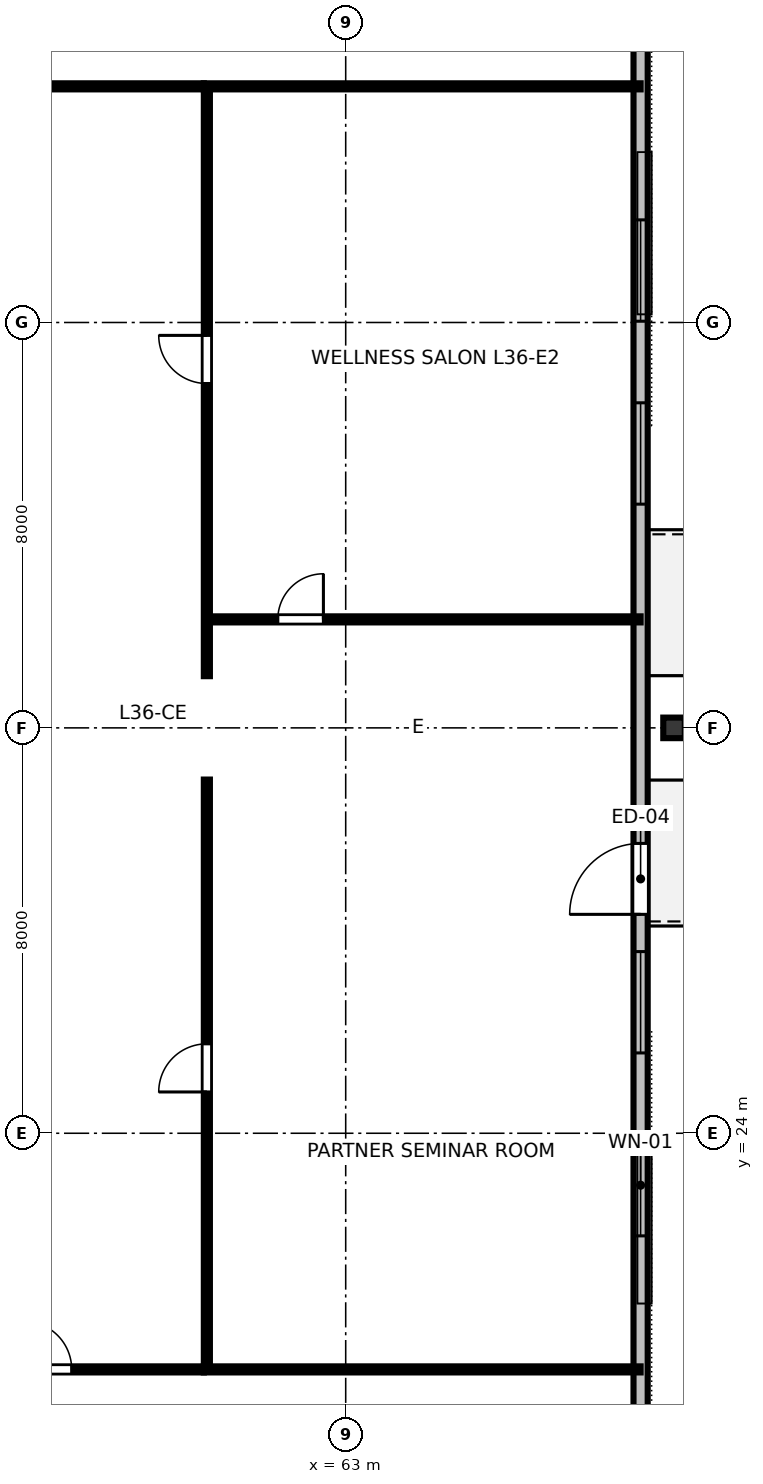
"""IFC4 building model, lengths in metres.
Left out: names, types, materials, properties, quantities, classifications, styles, units other than length and angle.
Written with IfcOpenShell. Run it as: python <this file> out.ifc"""

import sys

from ifc_helpers import new_model, si_unit, direction, frame, frame_2d, origin, origin_2d, place, context, subcontext, project, spatial, rectangle, i_section, extrude, element, fill, save


model = new_model("IFC4")
c1 = context("Model", 3, precision=1e-05, world=origin(), true_north=direction((0.0, 1.0)))
c2 = subcontext(c1, "Body", "Model", "MODEL_VIEW")
j1 = project(units=[si_unit("LENGTHUNIT", "METRE"), si_unit("PLANEANGLEUNIT", "RADIAN")], contexts=[c1])
p1 = place(None, origin())
s1 = spatial("IfcSite", under=j1, at=p1, CompositionType="ELEMENT")
p2 = place(p1, origin())
s2 = spatial("IfcBuilding", under=s1, at=p2, CompositionType="ELEMENT")
p3 = place(p2, frame((0.0, 0.0, 138.4)))
s3 = spatial("IfcBuildingStorey", under=s2, at=p3, CompositionType="ELEMENT", Elevation=138.4)
p4 = place(p3, frame((69.48, 32.0, 0.0), z_axis=(0.0, 0.0, 1.0), x_axis=(0.0, 1.0, 0.0)))
e1 = element("IfcColumn", 1, at=p4, inside=s3, PredefinedType="COLUMN", context=c2, shape_type="SweptSolid", body=[
    extrude(i_section(OverallWidth=0.406, OverallDepth=0.425, WebThickness=0.033, FlangeThickness=0.052, FilletRadius=0.025, at=origin_2d()), origin(), (0.0, 0.0, 1.0), 3.358),
])
p5 = place(p3, frame((68.82, 16.46, 0.0), z_axis=(0.0, 0.0, 1.0), x_axis=(0.0, 1.0, 0.0)))
e2 = element("IfcWall", 2, at=p5, inside=s3, PredefinedType="STANDARD", context=c2, shape_type="SweptSolid", body=[
    extrude(rectangle(XDim=31.08, YDim=0.28, at=frame_2d((15.54, 0.0))), origin(), (0.0, 0.0, 1.0), 3.36),
])
p6 = place(p5, frame((11.86, 0.0, 0.0)))
e3 = element("IfcOpeningElement", 3, at=p6, cuts=e2, PredefinedType="OPENING", context=c2, shape_type="SweptSolid", body=[
    extrude(rectangle(XDim=1.4, YDim=2.15, at=frame_2d((0.7, 1.075))), frame((0.0, 0.15, 0.0), z_axis=(0.0, -1.0, 0.0), x_axis=(1.0, 0.0, 0.0)), (0.0, 0.0, 1.0), 0.3),
])
p7 = place(p5, frame((5.515, 0.0, 0.8)))
e4 = element("IfcOpeningElement", 4, at=p7, cuts=e2, PredefinedType="OPENING", context=c2, shape_type="SweptSolid", body=[
    extrude(rectangle(XDim=2.0, YDim=1.95, at=frame_2d((1.0, 0.975))), frame((0.0, 0.15, 0.0), z_axis=(0.0, -1.0, 0.0), x_axis=(1.0, 0.0, 0.0)), (0.0, 0.0, 1.0), 0.3),
])
p8 = place(p5, frame((9.125, 0.0, 0.8)))
e5 = element("IfcOpeningElement", 5, at=p8, cuts=e2, PredefinedType="OPENING", context=c2, shape_type="SweptSolid", body=[
    extrude(rectangle(XDim=2.0, YDim=1.95, at=frame_2d((1.0, 0.975))), frame((0.0, 0.15, 0.0), z_axis=(0.0, -1.0, 0.0), x_axis=(1.0, 0.0, 0.0)), (0.0, 0.0, 1.0), 0.3),
])
p9 = place(p5, frame((19.955, 0.0, 0.8)))
e6 = element("IfcOpeningElement", 6, at=p9, cuts=e2, PredefinedType="OPENING", context=c2, shape_type="SweptSolid", body=[
    extrude(rectangle(XDim=2.0, YDim=1.95, at=frame_2d((1.0, 0.975))), frame((0.0, 0.15, 0.0), z_axis=(0.0, -1.0, 0.0), x_axis=(1.0, 0.0, 0.0)), (0.0, 0.0, 1.0), 0.3),
])
p10 = place(p5, frame((23.565, 0.0, 0.8)))
e7 = element("IfcOpeningElement", 7, at=p10, cuts=e2, PredefinedType="OPENING", context=c2, shape_type="SweptSolid", body=[
    extrude(rectangle(XDim=2.0, YDim=1.95, at=frame_2d((1.0, 0.975))), frame((0.0, 0.15, 0.0), z_axis=(0.0, -1.0, 0.0), x_axis=(1.0, 0.0, 0.0)), (0.0, 0.0, 1.0), 0.3),
])
p11 = place(p3, frame((31.8, 19.34, 0.0), z_axis=(0.0, 0.0, 1.0), x_axis=(1.0, 0.0, 0.0)))
e8 = element("IfcWall", 8, at=p11, inside=s3, PredefinedType="PARTITIONING", context=c2, shape_type="SweptSolid", body=[
    extrude(rectangle(XDim=28.4, YDim=0.12, at=frame_2d((14.2, 0.0))), origin(), (0.0, 0.0, 1.0), 2.64),
])
p12 = place(p11, frame((3.771, 0.0, 0.0)))
e9 = element("IfcOpeningElement", 9, at=p12, cuts=e8, PredefinedType="OPENING", context=c2, shape_type="SweptSolid", body=[
    extrude(rectangle(XDim=0.95, YDim=2.15, at=frame_2d((0.475, 1.075))), frame((0.0, 0.07, 0.0), z_axis=(0.0, -1.0, 0.0), x_axis=(1.0, 0.0, 0.0)), (0.0, 0.0, 1.0), 0.14),
])
p13 = place(p11, frame((10.068, 0.0, 0.0)))
e10 = element("IfcOpeningElement", 10, at=p13, cuts=e8, PredefinedType="OPENING", context=c2, shape_type="SweptSolid", body=[
    extrude(rectangle(XDim=0.95, YDim=2.15, at=frame_2d((0.475, 1.075))), frame((0.0, 0.07, 0.0), z_axis=(0.0, -1.0, 0.0), x_axis=(1.0, 0.0, 0.0)), (0.0, 0.0, 1.0), 0.14),
])
p14 = place(p11, frame((13.828, 0.0, 0.0)))
e11 = element("IfcOpeningElement", 11, at=p14, cuts=e8, PredefinedType="OPENING", context=c2, shape_type="SweptSolid", body=[
    extrude(rectangle(XDim=0.95, YDim=2.15, at=frame_2d((0.475, 1.075))), frame((0.0, 0.07, 0.0), z_axis=(0.0, -1.0, 0.0), x_axis=(1.0, 0.0, 0.0)), (0.0, 0.0, 1.0), 0.14),
])
p15 = place(p11, frame((18.648, 0.0, 0.0)))
e12 = element("IfcOpeningElement", 12, at=p15, cuts=e8, PredefinedType="OPENING", context=c2, shape_type="SweptSolid", body=[
    extrude(rectangle(XDim=0.95, YDim=2.15, at=frame_2d((0.475, 1.075))), frame((0.0, 0.07, 0.0), z_axis=(0.0, -1.0, 0.0), x_axis=(1.0, 0.0, 0.0)), (0.0, 0.0, 1.0), 0.14),
])
p16 = place(p11, frame((24.842, 0.0, 0.0)))
e13 = element("IfcOpeningElement", 13, at=p16, cuts=e8, PredefinedType="OPENING", context=c2, shape_type="SweptSolid", body=[
    extrude(rectangle(XDim=0.95, YDim=2.15, at=frame_2d((0.475, 1.075))), frame((0.0, 0.07, 0.0), z_axis=(0.0, -1.0, 0.0), x_axis=(1.0, 0.0, 0.0)), (0.0, 0.0, 1.0), 0.14),
])
p17 = place(p3, frame((31.8, 44.66, 0.0), z_axis=(0.0, 0.0, 1.0), x_axis=(1.0, 0.0, 0.0)))
e14 = element("IfcWall", 14, at=p17, inside=s3, PredefinedType="PARTITIONING", context=c2, shape_type="SweptSolid", body=[
    extrude(rectangle(XDim=28.4, YDim=0.12, at=frame_2d((14.2, 0.0))), origin(), (0.0, 0.0, 1.0), 2.64),
])
p18 = place(p17, frame((3.705, 0.0, 0.0)))
e15 = element("IfcOpeningElement", 15, at=p18, cuts=e14, PredefinedType="OPENING", context=c2, shape_type="SweptSolid", body=[
    extrude(rectangle(XDim=0.95, YDim=2.15, at=frame_2d((0.475, 1.075))), frame((0.0, 0.07, 0.0), z_axis=(0.0, -1.0, 0.0), x_axis=(1.0, 0.0, 0.0)), (0.0, 0.0, 1.0), 0.14),
])
p19 = place(p17, frame((11.836, 0.0, 0.0)))
e16 = element("IfcOpeningElement", 16, at=p19, cuts=e14, PredefinedType="OPENING", context=c2, shape_type="SweptSolid", body=[
    extrude(rectangle(XDim=0.95, YDim=2.15, at=frame_2d((0.475, 1.075))), frame((0.0, 0.07, 0.0), z_axis=(0.0, -1.0, 0.0), x_axis=(1.0, 0.0, 0.0)), (0.0, 0.0, 1.0), 0.14),
])
p20 = place(p17, frame((21.856, 0.0, 0.0)))
e17 = element("IfcOpeningElement", 17, at=p20, cuts=e14, PredefinedType="OPENING", context=c2, shape_type="SweptSolid", body=[
    extrude(rectangle(XDim=0.95, YDim=2.15, at=frame_2d((0.475, 1.075))), frame((0.0, 0.07, 0.0), z_axis=(0.0, -1.0, 0.0), x_axis=(1.0, 0.0, 0.0)), (0.0, 0.0, 1.0), 0.14),
])
p21 = place(p3, frame((60.26, 34.141, 0.0), z_axis=(0.0, 0.0, 1.0), x_axis=(1.0, 0.0, 0.0)))
e18 = element("IfcWall", 18, at=p21, inside=s3, PredefinedType="PARTITIONING", context=c2, shape_type="SweptSolid", body=[
    extrude(rectangle(XDim=8.56, YDim=0.12, at=frame_2d((4.28, 0.0))), origin(), (0.0, 0.0, 1.0), 2.64),
])
p22 = place(p21, frame((1.4, 0.0, 0.0)))
e19 = element("IfcOpeningElement", 19, at=p22, cuts=e18, PredefinedType="OPENING", context=c2, shape_type="SweptSolid", body=[
    extrude(rectangle(XDim=0.9, YDim=2.15, at=frame_2d((0.45, 1.075))), frame((0.0, 0.07, 0.0), z_axis=(0.0, -1.0, 0.0), x_axis=(1.0, 0.0, 0.0)), (0.0, 0.0, 1.0), 0.14),
])
p23 = place(p3, frame((60.26, 19.4, 0.0), z_axis=(0.0, 0.0, 1.0), x_axis=(0.0, 1.0, 0.0)))
e20 = element("IfcWall", 20, at=p23, inside=s3, PredefinedType="PARTITIONING", context=c2, shape_type="SweptSolid", body=[
    extrude(rectangle(XDim=11.58, YDim=0.12, at=frame_2d((5.79, 0.0))), origin(), (0.0, 0.0, 1.0), 2.64),
])
p24 = place(p23, frame((5.415, 0.0, 0.0)))
e21 = element("IfcOpeningElement", 21, at=p24, cuts=e20, PredefinedType="OPENING", context=c2, shape_type="SweptSolid", body=[
    extrude(rectangle(XDim=0.95, YDim=2.15, at=frame_2d((0.475, 1.075))), frame((0.0, 0.07, 0.0), z_axis=(0.0, -1.0, 0.0), x_axis=(1.0, 0.0, 0.0)), (0.0, 0.0, 1.0), 0.14),
])
p25 = place(p3, frame((60.26, 33.02, 0.0), z_axis=(0.0, 0.0, 1.0), x_axis=(0.0, 1.0, 0.0)))
e22 = element("IfcWall", 22, at=p25, inside=s3, PredefinedType="PARTITIONING", context=c2, shape_type="SweptSolid", body=[
    extrude(rectangle(XDim=11.58, YDim=0.12, at=frame_2d((5.79, 0.0))), origin(), (0.0, 0.0, 1.0), 2.64),
])
p26 = place(p25, frame((5.775, 0.0, 0.0)))
e23 = element("IfcOpeningElement", 23, at=p26, cuts=e22, PredefinedType="OPENING", context=c2, shape_type="SweptSolid", body=[
    extrude(rectangle(XDim=0.95, YDim=2.15, at=frame_2d((0.475, 1.075))), frame((0.0, 0.07, 0.0), z_axis=(0.0, -1.0, 0.0), x_axis=(1.0, 0.0, 0.0)), (0.0, 0.0, 1.0), 0.14),
])
for number, where, z_axis, x_axis in (
    (24, (60.2, 19.34, 0.0), (0.0, 0.0, 1.0), (1.0, 0.0, 0.0)),
    (25, (60.2, 44.66, 0.0), (0.0, 0.0, 1.0), (1.0, 0.0, 0.0)),
):
    element("IfcWall", number, at=place(p3, frame(where, z_axis=z_axis, x_axis=x_axis)), inside=s3, PredefinedType="PARTITIONING", context=c2, shape_type="SweptSolid", body=[
        extrude(rectangle(XDim=8.62, YDim=0.12, at=frame_2d((4.31, 0.0))), origin(), (0.0, 0.0, 1.0), 2.64),
    ])
p27 = place(p6, origin())
e26 = element("IfcDoor", 26, at=p27, inside=s3, OperationType="SINGLE_SWING_LEFT", PredefinedType="DOOR", context=c2, shape_type="SweptSolid", body=[
    extrude(rectangle(XDim=1.4, YDim=2.15, at=frame_2d((0.7, 1.075))), frame((0.0, 0.025, 0.0), z_axis=(0.0, -1.0, 0.0), x_axis=(1.0, 0.0, 0.0)), (0.0, 0.0, 1.0), 0.05),
])
fill(e3, e26)
p28 = place(p7, origin())
e27 = element("IfcWindow", 27, at=p28, inside=s3, PartitioningType="SINGLE_PANEL", PredefinedType="WINDOW", context=c2, shape_type="SweptSolid", body=[
    extrude(rectangle(XDim=2.0, YDim=1.95, at=frame_2d((1.0, 0.975))), frame((0.0, 0.03, 0.0), z_axis=(0.0, -1.0, 0.0), x_axis=(1.0, 0.0, 0.0)), (0.0, 0.0, 1.0), 0.06),
])
fill(e4, e27)
p29 = place(p8, origin())
e28 = element("IfcWindow", 28, at=p29, inside=s3, PartitioningType="SINGLE_PANEL", PredefinedType="WINDOW", context=c2, shape_type="SweptSolid", body=[
    extrude(rectangle(XDim=2.0, YDim=1.95, at=frame_2d((1.0, 0.975))), frame((0.0, 0.03, 0.0), z_axis=(0.0, -1.0, 0.0), x_axis=(1.0, 0.0, 0.0)), (0.0, 0.0, 1.0), 0.06),
])
fill(e5, e28)
p30 = place(p9, origin())
e29 = element("IfcWindow", 29, at=p30, inside=s3, PartitioningType="SINGLE_PANEL", PredefinedType="WINDOW", context=c2, shape_type="SweptSolid", body=[
    extrude(rectangle(XDim=2.0, YDim=1.95, at=frame_2d((1.0, 0.975))), frame((0.0, 0.03, 0.0), z_axis=(0.0, -1.0, 0.0), x_axis=(1.0, 0.0, 0.0)), (0.0, 0.0, 1.0), 0.06),
])
fill(e6, e29)
p31 = place(p10, origin())
e30 = element("IfcWindow", 30, at=p31, inside=s3, PartitioningType="SINGLE_PANEL", PredefinedType="WINDOW", context=c2, shape_type="SweptSolid", body=[
    extrude(rectangle(XDim=2.0, YDim=1.95, at=frame_2d((1.0, 0.975))), frame((0.0, 0.03, 0.0), z_axis=(0.0, -1.0, 0.0), x_axis=(1.0, 0.0, 0.0)), (0.0, 0.0, 1.0), 0.06),
])
fill(e7, e30)
p32 = place(p16, origin())
e31 = element("IfcDoor", 31, at=p32, inside=s3, OperationType="SINGLE_SWING_LEFT", PredefinedType="DOOR", context=c2, shape_type="SweptSolid", body=[
    extrude(rectangle(XDim=0.95, YDim=2.15, at=frame_2d((0.475, 1.075))), frame((0.0, 0.025, 0.0), z_axis=(0.0, -1.0, 0.0), x_axis=(1.0, 0.0, 0.0)), (0.0, 0.0, 1.0), 0.05),
])
fill(e13, e31)
p33 = place(p22, origin())
e32 = element("IfcDoor", 32, at=p33, inside=s3, OperationType="SINGLE_SWING_RIGHT", PredefinedType="DOOR", context=c2, shape_type="SweptSolid", body=[
    extrude(rectangle(XDim=0.9, YDim=2.15, at=frame_2d((0.45, 1.075))), frame((0.0, 0.025, 0.0), z_axis=(0.0, -1.0, 0.0), x_axis=(1.0, 0.0, 0.0)), (0.0, 0.0, 1.0), 0.05),
])
fill(e19, e32)
p34 = place(p24, origin())
e33 = element("IfcDoor", 33, at=p34, inside=s3, OperationType="SINGLE_SWING_LEFT", PredefinedType="DOOR", context=c2, shape_type="SweptSolid", body=[
    extrude(rectangle(XDim=0.95, YDim=2.15, at=frame_2d((0.475, 1.075))), frame((0.0, 0.025, 0.0), z_axis=(0.0, -1.0, 0.0), x_axis=(1.0, 0.0, 0.0)), (0.0, 0.0, 1.0), 0.05),
])
fill(e21, e33)
p35 = place(p26, origin())
e34 = element("IfcDoor", 34, at=p35, inside=s3, OperationType="SINGLE_SWING_RIGHT", PredefinedType="DOOR", context=c2, shape_type="SweptSolid", body=[
    extrude(rectangle(XDim=0.95, YDim=2.15, at=frame_2d((0.475, 1.075))), frame((0.0, 0.025, 0.0), z_axis=(0.0, -1.0, 0.0), x_axis=(1.0, 0.0, 0.0)), (0.0, 0.0, 1.0), 0.05),
])
fill(e23, e34)
save(model, sys.argv[1])
